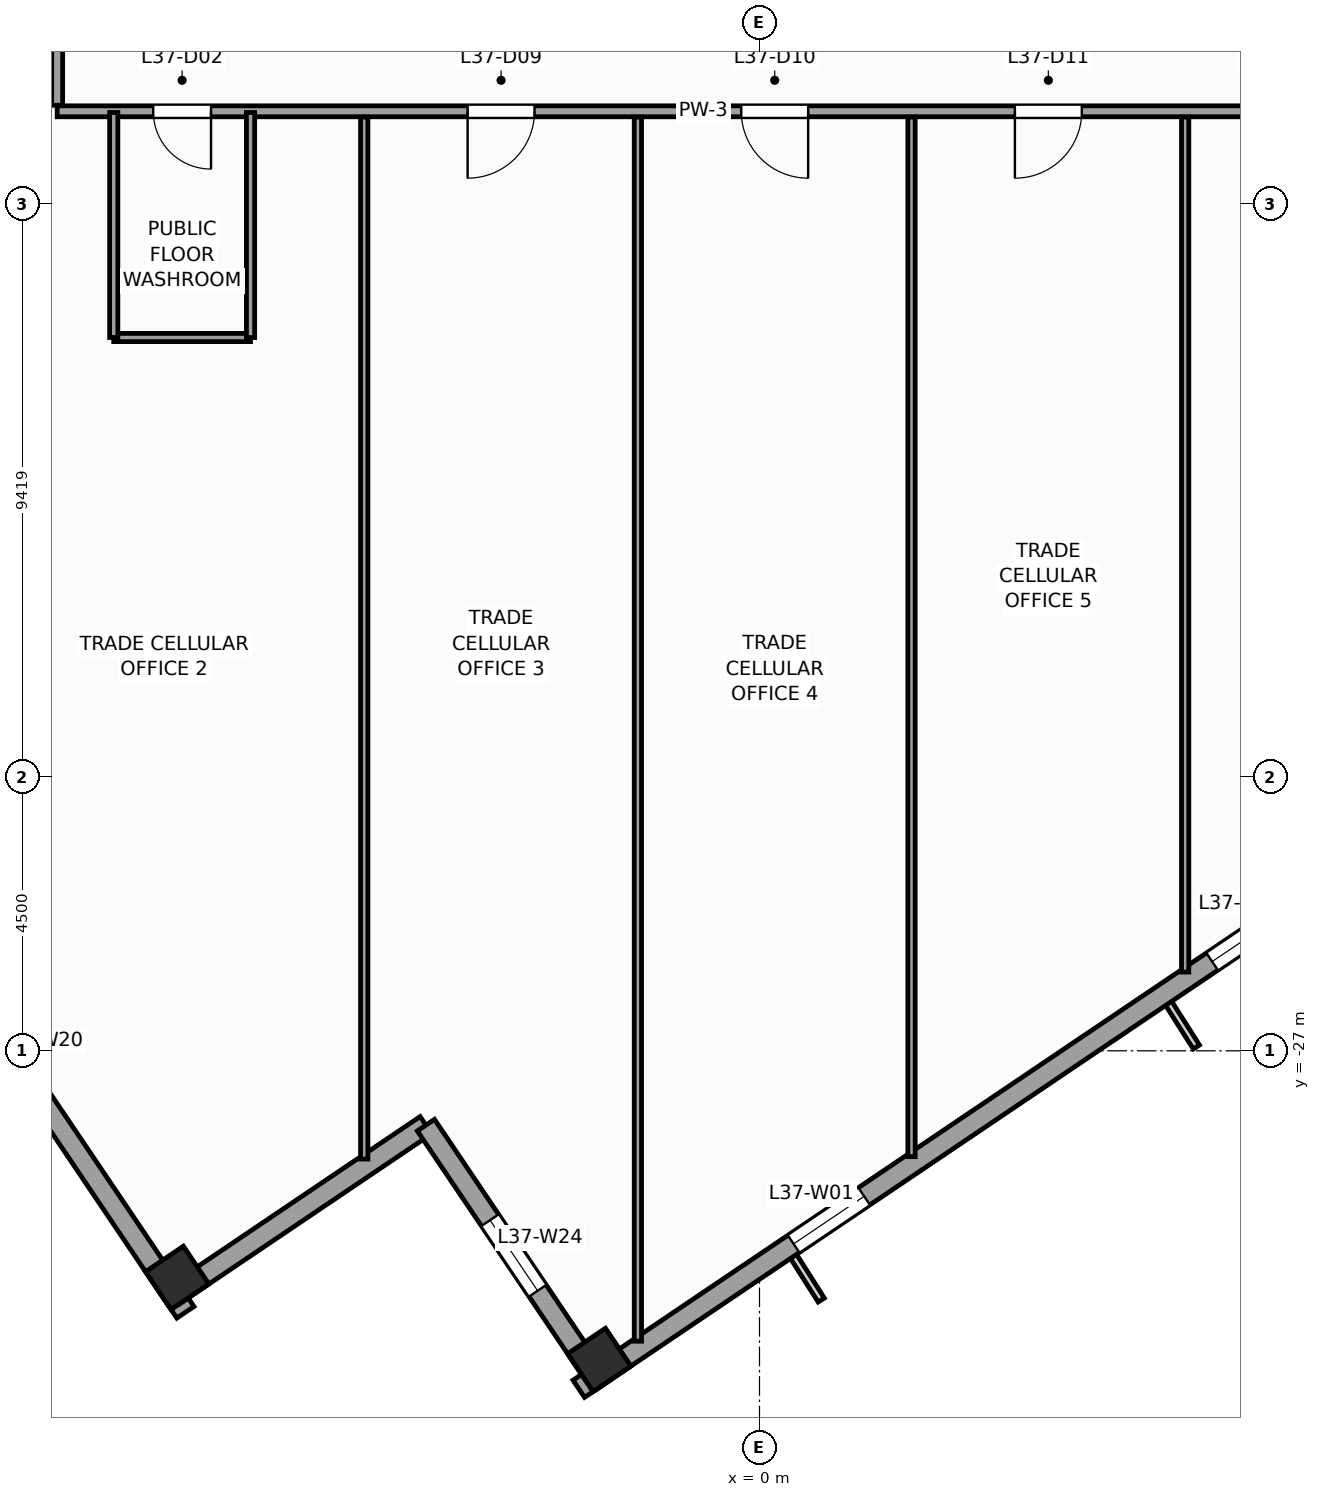
"""IFC4 building model, lengths in metres.
Left out: names, types, materials, properties, quantities, classifications, styles, units other than length and angle.
Written with IfcOpenShell. Run it as: python <this file> out.ifc"""

import sys

from ifc_helpers import new_model, si_unit, direction, frame, frame_2d, origin, origin_2d, place, context, subcontext, project, spatial, rectangle, extrude, source, transform, mapped, element, fill, save


model = new_model("IFC4")
c1 = context("Model", 3, precision=1e-05, world=origin(), true_north=direction((0.0, 1.0)))
c2 = subcontext(c1, "Body", "Model", "MODEL_VIEW")
j1 = project(units=[si_unit("LENGTHUNIT", "METRE"), si_unit("PLANEANGLEUNIT", "RADIAN")], contexts=[c1])
p1 = place(None, origin())
s1 = spatial("IfcSite", under=j1, at=p1, CompositionType="ELEMENT")
p2 = place(p1, origin())
s2 = spatial("IfcBuilding", under=s1, at=p2, CompositionType="ELEMENT")
p3 = place(p2, frame((0.0, 0.0, 156.4)))
s3 = spatial("IfcBuildingStorey", under=s2, at=p3, CompositionType="ELEMENT", Elevation=156.4)
m1 = source(origin(), c2, "Body", "SweptSolid", [
    extrude(rectangle(XDim=0.75, YDim=0.75, at=origin_2d()), origin(), (0.0, 0.0, 1.0), 4.0),
])
for number, where, z_axis, x_axis in (
    (1, (-2.635, -32.083, 0.0), (0.0, 0.0, 1.0), (0.829, 0.559, 0.0)),
    (2, (-9.576, -30.734, 0.0), (0.0, 0.0, 1.0), (0.829, 0.559, 0.0)),
):
    element("IfcColumn", number, at=place(p3, frame(where, z_axis=z_axis, x_axis=x_axis)), inside=s3, PredefinedType="COLUMN", context=c2, shape_type="MappedRepresentation", body=[
        mapped(m1, transform((0.0, 0.0, 0.0), scale=1.0)),
    ])
p4 = place(p3, frame((-2.972, -32.558, 0.0), z_axis=(0.0, 0.0, 1.0), x_axis=(0.829036218961, 0.559194910251, 0.0)))
e3 = element("IfcWall", 3, at=p4, inside=s3, PredefinedType="STANDARD", context=c2, shape_type="SweptSolid", body=[
    extrude(rectangle(XDim=41.34, YDim=0.34, at=frame_2d((20.67, 0.0))), origin(), (0.0, 0.0, 1.0), 3.04),
])
p5 = place(p4, frame((4.261, 0.0, 0.56)))
e4 = element("IfcOpeningElement", 4, at=p5, cuts=e3, PredefinedType="OPENING", context=c2, shape_type="SweptSolid", body=[
    extrude(rectangle(XDim=1.4, YDim=2.4, at=frame_2d((0.7, 1.2))), frame((0.0, 0.18, 0.0), z_axis=(0.0, -1.0, 0.0), x_axis=(1.0, 0.0, 0.0)), (0.0, 0.0, 1.0), 0.36),
])
p6 = place(p4, frame((12.564, 0.0, 0.61)))
e5 = element("IfcOpeningElement", 5, at=p6, cuts=e3, PredefinedType="OPENING", context=c2, shape_type="SweptSolid", body=[
    extrude(rectangle(XDim=1.85, YDim=2.35, at=frame_2d((0.925, 1.175))), frame((0.0, 0.18, 0.0), z_axis=(0.0, -1.0, 0.0), x_axis=(1.0, 0.0, 0.0)), (0.0, 0.0, 1.0), 0.36),
])
p7 = place(p4, frame((16.668, 0.0, 0.61)))
e6 = element("IfcOpeningElement", 6, at=p7, cuts=e3, PredefinedType="OPENING", context=c2, shape_type="SweptSolid", body=[
    extrude(rectangle(XDim=1.85, YDim=2.35, at=frame_2d((0.925, 1.175))), frame((0.0, 0.18, 0.0), z_axis=(0.0, -1.0, 0.0), x_axis=(1.0, 0.0, 0.0)), (0.0, 0.0, 1.0), 0.36),
])
p8 = place(p4, frame((27.186, 0.0, 0.61)))
e7 = element("IfcOpeningElement", 7, at=p8, cuts=e3, PredefinedType="OPENING", context=c2, shape_type="SweptSolid", body=[
    extrude(rectangle(XDim=1.85, YDim=2.35, at=frame_2d((0.925, 1.175))), frame((0.0, 0.18, 0.0), z_axis=(0.0, -1.0, 0.0), x_axis=(1.0, 0.0, 0.0)), (0.0, 0.0, 1.0), 0.36),
])
p9 = place(p4, frame((34.852, 0.0, 0.56)))
e8 = element("IfcOpeningElement", 8, at=p9, cuts=e3, PredefinedType="OPENING", context=c2, shape_type="SweptSolid", body=[
    extrude(rectangle(XDim=1.4, YDim=2.4, at=frame_2d((0.7, 1.2))), frame((0.0, 0.18, 0.0), z_axis=(0.0, -1.0, 0.0), x_axis=(1.0, 0.0, 0.0)), (0.0, 0.0, 1.0), 0.36),
])
p10 = place(p3, frame((-32.558, 2.972, 0.0), z_axis=(0.0, 0.0, 1.0), x_axis=(0.559194910251, -0.829036218961, 0.0)))
e9 = element("IfcWall", 9, at=p10, inside=s3, PredefinedType="STANDARD", context=c2, shape_type="SweptSolid", body=[
    extrude(rectangle(XDim=41.34, YDim=0.34, at=frame_2d((20.67, 0.0))), origin(), (0.0, 0.0, 1.0), 3.04),
])
p11 = place(p10, frame((25.745, 0.0, 0.0)))
e10 = element("IfcOpeningElement", 10, at=p11, cuts=e9, PredefinedType="OPENING", context=c2, shape_type="SweptSolid", body=[
    extrude(rectangle(XDim=1.05, YDim=2.25, at=frame_2d((0.525, 1.125))), frame((0.0, 0.18, 0.0), z_axis=(0.0, -1.0, 0.0), x_axis=(1.0, 0.0, 0.0)), (0.0, 0.0, 1.0), 0.36),
])
p12 = place(p10, frame((5.761, 0.0, 0.56)))
e11 = element("IfcOpeningElement", 11, at=p12, cuts=e9, PredefinedType="OPENING", context=c2, shape_type="SweptSolid", body=[
    extrude(rectangle(XDim=1.4, YDim=2.4, at=frame_2d((0.7, 1.2))), frame((0.0, 0.18, 0.0), z_axis=(0.0, -1.0, 0.0), x_axis=(1.0, 0.0, 0.0)), (0.0, 0.0, 1.0), 0.36),
])
p13 = place(p10, frame((11.064, 0.0, 0.61)))
e12 = element("IfcOpeningElement", 12, at=p13, cuts=e9, PredefinedType="OPENING", context=c2, shape_type="SweptSolid", body=[
    extrude(rectangle(XDim=1.85, YDim=2.35, at=frame_2d((0.925, 1.175))), frame((0.0, 0.18, 0.0), z_axis=(0.0, -1.0, 0.0), x_axis=(1.0, 0.0, 0.0)), (0.0, 0.0, 1.0), 0.36),
])
p14 = place(p10, frame((18.168, 0.0, 0.61)))
e13 = element("IfcOpeningElement", 13, at=p14, cuts=e9, PredefinedType="OPENING", context=c2, shape_type="SweptSolid", body=[
    extrude(rectangle(XDim=1.85, YDim=2.35, at=frame_2d((0.925, 1.175))), frame((0.0, 0.18, 0.0), z_axis=(0.0, -1.0, 0.0), x_axis=(1.0, 0.0, 0.0)), (0.0, 0.0, 1.0), 0.36),
])
p15 = place(p10, frame((27.936, 0.0, 0.61)))
e14 = element("IfcOpeningElement", 14, at=p15, cuts=e9, PredefinedType="OPENING", context=c2, shape_type="SweptSolid", body=[
    extrude(rectangle(XDim=1.85, YDim=2.35, at=frame_2d((0.925, 1.175))), frame((0.0, 0.18, 0.0), z_axis=(0.0, -1.0, 0.0), x_axis=(1.0, 0.0, 0.0)), (0.0, 0.0, 1.0), 0.36),
])
p16 = place(p10, frame((35.602, 0.0, 0.56)))
e15 = element("IfcOpeningElement", 15, at=p16, cuts=e9, PredefinedType="OPENING", context=c2, shape_type="SweptSolid", body=[
    extrude(rectangle(XDim=1.4, YDim=2.4, at=frame_2d((0.7, 1.2))), frame((0.0, 0.18, 0.0), z_axis=(0.0, -1.0, 0.0), x_axis=(1.0, 0.0, 0.0)), (0.0, 0.0, 1.0), 0.36),
])
p17 = place(p3, frame((-9.631, -31.019, 0.0), z_axis=(0.0, 0.0, 1.0), x_axis=(0.829025804298, 0.559210350234, 0.0)))
e16 = element("IfcWall", 16, at=p17, inside=s3, PredefinedType="STANDARD", context=c2, shape_type="SweptSolid", body=[
    extrude(rectangle(XDim=5.0, YDim=0.34, at=frame_2d((2.5, 0.0))), origin(), (0.0, 0.0, 1.0), 3.74),
])
p18 = place(p3, frame((-5.486, -28.223, 0.0), z_axis=(0.0, 0.0, 1.0), x_axis=(0.559171107879, -0.82905227345, 0.0)))
e17 = element("IfcWall", 17, at=p18, inside=s3, PredefinedType="STANDARD", context=c2, shape_type="SweptSolid", body=[
    extrude(rectangle(XDim=5.17, YDim=0.34, at=frame_2d((2.585, 0.0))), origin(), (0.0, 0.0, 1.0), 3.04),
])
p19 = place(p18, frame((1.885, 0.0, 0.56)))
e18 = element("IfcOpeningElement", 18, at=p19, cuts=e17, PredefinedType="OPENING", context=c2, shape_type="SweptSolid", body=[
    extrude(rectangle(XDim=1.4, YDim=2.4, at=frame_2d((0.7, 1.2))), frame((0.0, 0.18, 0.0), z_axis=(0.0, -1.0, 0.0), x_axis=(1.0, 0.0, 0.0)), (0.0, 0.0, 1.0), 0.36),
])
p20 = place(p3, frame((-11.55, -11.55, 0.0), z_axis=(0.0, 0.0, 1.0), x_axis=(1.0, 0.0, 0.0)))
e19 = element("IfcWall", 19, at=p20, inside=s3, PredefinedType="PARTITIONING", context=c2, shape_type="SweptSolid", body=[
    extrude(rectangle(XDim=22.0, YDim=0.18, at=frame_2d((11.0, 0.0))), origin(), (0.0, 0.0, 1.0), 3.74),
])
p21 = place(p20, frame((1.58, 0.0, 0.0)))
e20 = element("IfcOpeningElement", 20, at=p21, cuts=e19, PredefinedType="OPENING", context=c2, shape_type="SweptSolid", body=[
    extrude(rectangle(XDim=0.95, YDim=2.1, at=frame_2d((0.475, 1.05))), frame((0.0, 0.1, 0.0), z_axis=(0.0, -1.0, 0.0), x_axis=(1.0, 0.0, 0.0)), (0.0, 0.0, 1.0), 0.2),
])
p22 = place(p20, frame((6.75, 0.0, 0.0)))
e21 = element("IfcOpeningElement", 21, at=p22, cuts=e19, PredefinedType="OPENING", context=c2, shape_type="SweptSolid", body=[
    extrude(rectangle(XDim=1.1, YDim=2.2, at=frame_2d((0.55, 1.1))), frame((0.0, 0.1, 0.0), z_axis=(0.0, -1.0, 0.0), x_axis=(1.0, 0.0, 0.0)), (0.0, 0.0, 1.0), 0.2),
])
p23 = place(p20, frame((11.25, 0.0, 0.0)))
e22 = element("IfcOpeningElement", 22, at=p23, cuts=e19, PredefinedType="OPENING", context=c2, shape_type="SweptSolid", body=[
    extrude(rectangle(XDim=1.1, YDim=2.2, at=frame_2d((0.55, 1.1))), frame((0.0, 0.1, 0.0), z_axis=(0.0, -1.0, 0.0), x_axis=(1.0, 0.0, 0.0)), (0.0, 0.0, 1.0), 0.2),
])
p24 = place(p20, frame((15.75, 0.0, 0.0)))
e23 = element("IfcOpeningElement", 23, at=p24, cuts=e19, PredefinedType="OPENING", context=c2, shape_type="SweptSolid", body=[
    extrude(rectangle(XDim=1.1, YDim=2.2, at=frame_2d((0.55, 1.1))), frame((0.0, 0.1, 0.0), z_axis=(0.0, -1.0, 0.0), x_axis=(1.0, 0.0, 0.0)), (0.0, 0.0, 1.0), 0.2),
])
p25 = place(p20, frame((19.561, 0.0, 0.0)))
e24 = element("IfcOpeningElement", 24, at=p25, cuts=e19, PredefinedType="OPENING", context=c2, shape_type="SweptSolid", body=[
    extrude(rectangle(XDim=1.1, YDim=2.2, at=frame_2d((0.55, 1.1))), frame((0.0, 0.1, 0.0), z_axis=(0.0, -1.0, 0.0), x_axis=(1.0, 0.0, 0.0)), (0.0, 0.0, 1.0), 0.2),
])
p26 = place(p3, frame((-11.55, -11.45, 0.0), z_axis=(0.0, 0.0, 1.0), x_axis=(0.0, 1.0, 0.0)))
e25 = element("IfcWall", 25, at=p26, inside=s3, PredefinedType="PARTITIONING", context=c2, shape_type="SweptSolid", body=[
    extrude(rectangle(XDim=13.05, YDim=0.18, at=frame_2d((6.525, 0.0))), origin(), (0.0, 0.0, 1.0), 3.74),
])
p27 = place(p26, frame((4.086, 0.0, 0.0)))
e26 = element("IfcOpeningElement", 26, at=p27, cuts=e25, PredefinedType="OPENING", context=c2, shape_type="SweptSolid", body=[
    extrude(rectangle(XDim=0.95, YDim=2.1, at=frame_2d((0.475, 1.05))), frame((0.0, 0.1, 0.0), z_axis=(0.0, -1.0, 0.0), x_axis=(1.0, 0.0, 0.0)), (0.0, 0.0, 1.0), 0.2),
])
p28 = place(p26, frame((11.01, 0.0, 0.0)))
e27 = element("IfcOpeningElement", 27, at=p28, cuts=e25, PredefinedType="OPENING", context=c2, shape_type="SweptSolid", body=[
    extrude(rectangle(XDim=1.1, YDim=2.2, at=frame_2d((0.55, 1.1))), frame((0.0, 0.1, 0.0), z_axis=(0.0, -1.0, 0.0), x_axis=(1.0, 0.0, 0.0)), (0.0, 0.0, 1.0), 0.2),
])
p29 = place(p26, frame((8.775, 0.0, 0.0)))
e28 = element("IfcOpeningElement", 28, at=p29, cuts=e25, PredefinedType="OPENING", context=c2, shape_type="SweptSolid", body=[
    extrude(rectangle(XDim=1.1, YDim=2.2, at=frame_2d((0.55, 1.1))), frame((0.0, 0.1, 0.0), z_axis=(0.0, -1.0, 0.0), x_axis=(1.0, 0.0, 0.0)), (0.0, 0.0, 1.0), 0.2),
])
p30 = place(p26, frame((6.35, 0.0, 0.0)))
e29 = element("IfcOpeningElement", 29, at=p30, cuts=e25, PredefinedType="OPENING", context=c2, shape_type="SweptSolid", body=[
    extrude(rectangle(XDim=1.1, YDim=2.2, at=frame_2d((0.55, 1.1))), frame((0.0, 0.1, 0.0), z_axis=(0.0, -1.0, 0.0), x_axis=(1.0, 0.0, 0.0)), (0.0, 0.0, 1.0), 0.2),
])
p31 = place(p26, frame((1.24, 0.0, 0.0)))
e30 = element("IfcOpeningElement", 30, at=p31, cuts=e25, PredefinedType="OPENING", context=c2, shape_type="SweptSolid", body=[
    extrude(rectangle(XDim=1.1, YDim=2.2, at=frame_2d((0.55, 1.1))), frame((0.0, 0.1, 0.0), z_axis=(0.0, -1.0, 0.0), x_axis=(1.0, 0.0, 0.0)), (0.0, 0.0, 1.0), 0.2),
])
p32 = place(p3, frame((-6.5, -28.78, 0.0), z_axis=(0.0, 0.0, 1.0), x_axis=(0.0, 1.0, 0.0)))
e31 = element("IfcWall", 31, at=p32, inside=s3, PredefinedType="PARTITIONING", context=c2, shape_type="SweptSolid", body=[
    extrude(rectangle(XDim=17.135, YDim=0.12, at=frame_2d((8.567, 0.0))), origin(), (0.0, 0.0, 1.0), 3.74),
])
p33 = place(p3, frame((-2.0, -31.776, 0.0), z_axis=(0.0, 0.0, 1.0), x_axis=(0.0, 1.0, 0.0)))
e32 = element("IfcWall", 32, at=p33, inside=s3, PredefinedType="PARTITIONING", context=c2, shape_type="SweptSolid", body=[
    extrude(rectangle(XDim=20.131, YDim=0.12, at=frame_2d((10.065, 0.0))), origin(), (0.0, 0.0, 1.0), 3.74),
])
p34 = place(p3, frame((2.5, -28.74, 0.0), z_axis=(0.0, 0.0, 1.0), x_axis=(0.0, 1.0, 0.0)))
e33 = element("IfcWall", 33, at=p34, inside=s3, PredefinedType="PARTITIONING", context=c2, shape_type="SweptSolid", body=[
    extrude(rectangle(XDim=17.095, YDim=0.12, at=frame_2d((8.548, 0.0))), origin(), (0.0, 0.0, 1.0), 3.74),
])
p35 = place(p3, frame((7.0, -25.705, 0.0), z_axis=(0.0, 0.0, 1.0), x_axis=(0.0, 1.0, 0.0)))
e34 = element("IfcWall", 34, at=p35, inside=s3, PredefinedType="PARTITIONING", context=c2, shape_type="SweptSolid", body=[
    extrude(rectangle(XDim=14.06, YDim=0.12, at=frame_2d((7.03, 0.0))), origin(), (0.0, 0.0, 1.0), 3.74),
])
p36 = place(p3, frame((-10.62, -15.27, 0.0), z_axis=(0.0, 0.0, 1.0), x_axis=(1.0, 0.0, 0.0)))
e35 = element("IfcWall", 35, at=p36, inside=s3, PredefinedType="PARTITIONING", context=c2, shape_type="SweptSolid", body=[
    extrude(rectangle(XDim=2.25, YDim=0.135, at=frame_2d((1.125, 0.0))), origin(), (0.0, 0.0, 1.0), 3.74),
])
for number, where, z_axis, x_axis in (
    (36, (-8.37, -15.27, 0.0), (0.0, 0.0, 1.0), (0.0, 1.0, 0.0)),
    (37, (-10.62, -15.27, 0.0), (0.0, 0.0, 1.0), (0.0, 1.0, 0.0)),
):
    element("IfcWall", number, at=place(p3, frame(where, z_axis=z_axis, x_axis=x_axis)), inside=s3, PredefinedType="PARTITIONING", context=c2, shape_type="SweptSolid", body=[
        extrude(rectangle(XDim=3.7, YDim=0.135, at=frame_2d((1.85, 0.0))), origin(), (0.0, 0.0, 1.0), 3.74),
    ])
m2 = source(origin(), c2, "Body", "SweptSolid", [
    extrude(rectangle(XDim=1.4, YDim=2.4, at=frame_2d((0.7, 1.2))), frame((0.0, 0.03, 0.0), z_axis=(0.0, -1.0, 0.0), x_axis=(1.0, 0.0, 0.0)), (0.0, 0.0, 1.0), 0.06),
])
p37 = place(p5, origin())
e38 = element("IfcWindow", 38, at=p37, inside=s3, PartitioningType="SINGLE_PANEL", PredefinedType="WINDOW", context=c2, shape_type="MappedRepresentation", body=[
    mapped(m2, transform((0.0, 0.0, 0.0), scale=1.0)),
])
fill(e4, e38)
m3 = source(origin(), c2, "Body", "SweptSolid", [
    extrude(rectangle(XDim=1.85, YDim=2.35, at=frame_2d((0.925, 1.175))), frame((0.0, 0.03, 0.0), z_axis=(0.0, -1.0, 0.0), x_axis=(1.0, 0.0, 0.0)), (0.0, 0.0, 1.0), 0.06),
])
p38 = place(p6, origin())
e39 = element("IfcWindow", 39, at=p38, inside=s3, PartitioningType="SINGLE_PANEL", PredefinedType="WINDOW", context=c2, shape_type="MappedRepresentation", body=[
    mapped(m3, transform((0.0, 0.0, 0.0), scale=1.0)),
])
fill(e5, e39)
p39 = place(p19, origin())
e40 = element("IfcWindow", 40, at=p39, inside=s3, PartitioningType="SINGLE_PANEL", PredefinedType="WINDOW", context=c2, shape_type="MappedRepresentation", body=[
    mapped(m2, transform((0.0, 0.0, 0.0), scale=1.0)),
])
fill(e18, e40)
m4 = source(origin(), c2, "Body", "SweptSolid", [
    extrude(rectangle(XDim=0.95, YDim=2.1, at=frame_2d((0.475, 1.05))), frame((0.0, 0.025, 0.0), z_axis=(0.0, -1.0, 0.0), x_axis=(1.0, 0.0, 0.0)), (0.0, 0.0, 1.0), 0.05),
])
p40 = place(p21, frame((0.95, 0.0, 0.0), z_axis=(0.0, 0.0, 1.0), x_axis=(-1.0, 0.0, 0.0)))
e41 = element("IfcDoor", 41, at=p40, inside=s3, OperationType="SINGLE_SWING_RIGHT", PredefinedType="DOOR", context=c2, shape_type="MappedRepresentation", body=[
    mapped(m4, transform((0.0, 0.0, 0.0), scale=1.0)),
])
fill(e20, e41)
m5 = source(origin(), c2, "Body", "SweptSolid", [
    extrude(rectangle(XDim=1.1, YDim=2.2, at=frame_2d((0.55, 1.1))), frame((0.0, 0.025, 0.0), z_axis=(0.0, -1.0, 0.0), x_axis=(1.0, 0.0, 0.0)), (0.0, 0.0, 1.0), 0.05),
])
p41 = place(p22, frame((1.1, 0.0, 0.0), z_axis=(0.0, 0.0, 1.0), x_axis=(-1.0, 0.0, 0.0)))
e42 = element("IfcDoor", 42, at=p41, inside=s3, OperationType="SINGLE_SWING_LEFT", PredefinedType="DOOR", context=c2, shape_type="MappedRepresentation", body=[
    mapped(m5, transform((0.0, 0.0, 0.0), scale=1.0)),
])
fill(e21, e42)
p42 = place(p23, frame((1.1, 0.0, 0.0), z_axis=(0.0, 0.0, 1.0), x_axis=(-1.0, 0.0, 0.0)))
e43 = element("IfcDoor", 43, at=p42, inside=s3, OperationType="SINGLE_SWING_RIGHT", PredefinedType="DOOR", context=c2, shape_type="MappedRepresentation", body=[
    mapped(m5, transform((0.0, 0.0, 0.0), scale=1.0)),
])
fill(e22, e43)
p43 = place(p24, frame((1.1, 0.0, 0.0), z_axis=(0.0, 0.0, 1.0), x_axis=(-1.0, 0.0, 0.0)))
e44 = element("IfcDoor", 44, at=p43, inside=s3, OperationType="SINGLE_SWING_LEFT", PredefinedType="DOOR", context=c2, shape_type="MappedRepresentation", body=[
    mapped(m5, transform((0.0, 0.0, 0.0), scale=1.0)),
])
fill(e23, e44)
save(model, sys.argv[1])
